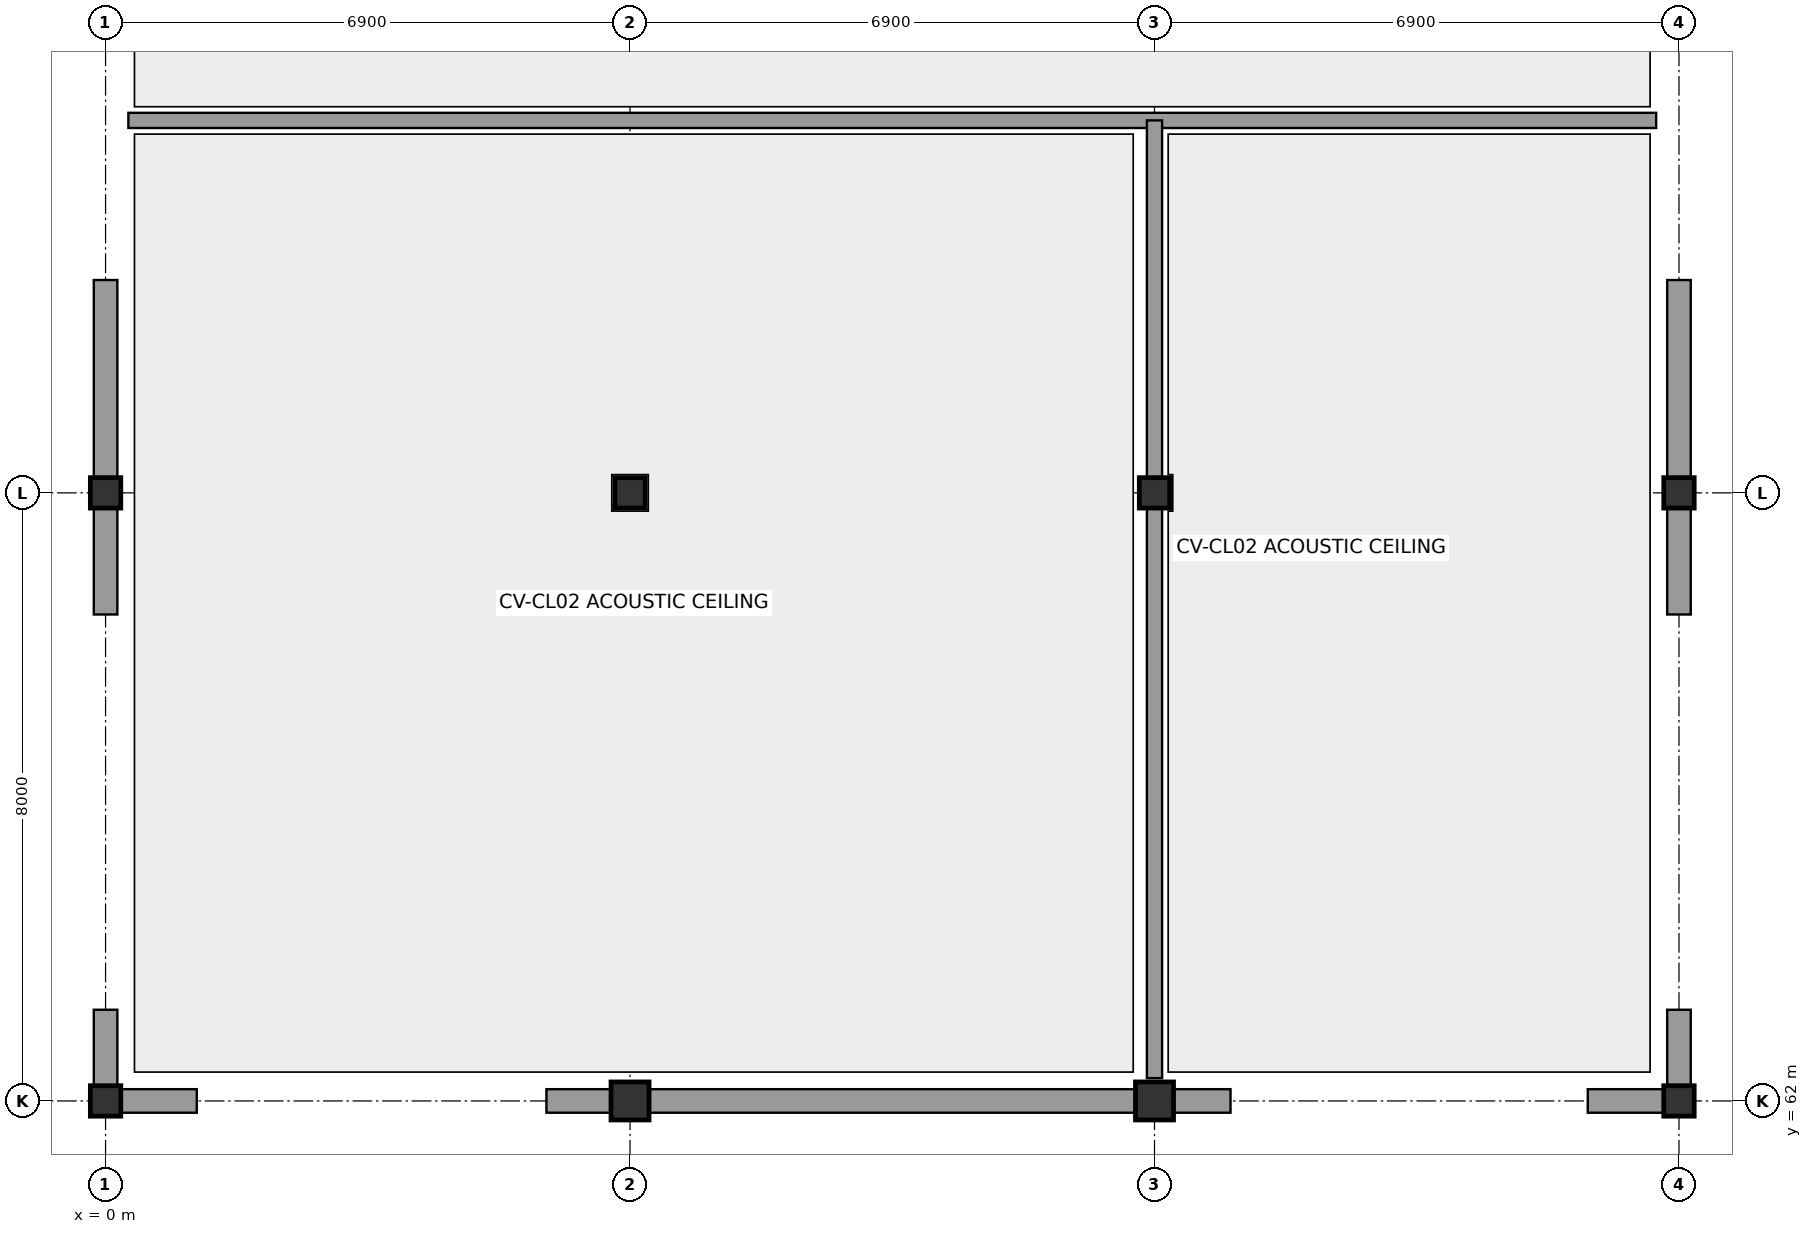
"""IFC4 building model, lengths in metres.
Left out: names, types, materials, properties, quantities, classifications, styles, units other than length and angle.
Written with IfcOpenShell. Run it as: python <this file> out.ifc"""

import sys

from ifc_helpers import new_model, si_unit, direction, frame, frame_2d, origin, origin_with_axes, origin_2d, place, context, subcontext, project, spatial, rectangle, circle, extrude, element, fill, save


model = new_model("IFC4")
c1 = context("Model", 3, precision=1e-05, world=origin(), true_north=direction((0.0, 1.0)))
c2 = subcontext(c1, "Body", "Model", "MODEL_VIEW")
j1 = project(units=[si_unit("LENGTHUNIT", "METRE"), si_unit("PLANEANGLEUNIT", "RADIAN")], contexts=[c1])
p1 = place(None, origin())
s1 = spatial("IfcSite", under=j1, at=p1, CompositionType="ELEMENT")
p2 = place(p1, origin())
s2 = spatial("IfcBuilding", under=s1, at=p2, CompositionType="ELEMENT")
p3 = place(p2, origin())
s3 = spatial("IfcBuildingStorey", under=s2, at=p3, CompositionType="ELEMENT", Elevation=0.0)
for number, where, z_axis, x_axis in (
    (1, (0.0, 62.0, 0.0), (0.0, 0.0, 1.0), (1.0, 0.0, 0.0)),
    (2, (0.0, 70.0, 0.0), (0.0, 0.0, 1.0), (1.0, 0.0, 0.0)),
):
    element("IfcColumn", number, at=place(p3, frame(where, z_axis=z_axis, x_axis=x_axis)), inside=s3, PredefinedType="COLUMN", context=c2, shape_type="SweptSolid", body=[
        extrude(rectangle(XDim=0.4, YDim=0.4, at=origin_2d()), origin(), (0.0, 0.0, 1.0), 4.4),
    ])
p4 = place(p3, frame((6.9, 62.0, 0.0), z_axis=(0.0, 0.0, 1.0), x_axis=(1.0, 0.0, 0.0)))
e3 = element("IfcColumn", 3, at=p4, inside=s3, PredefinedType="COLUMN", context=c2, shape_type="SweptSolid", body=[
    extrude(circle(Radius=0.25, at=origin_2d()), origin(), (0.0, 0.0, 1.0), 4.4),
])
p5 = place(p3, frame((6.9, 70.0, 0.0), z_axis=(0.0, 0.0, 1.0), x_axis=(1.0, 0.0, 0.0)))
e4 = element("IfcColumn", 4, at=p5, inside=s3, PredefinedType="COLUMN", context=c2, shape_type="SweptSolid", body=[
    extrude(rectangle(XDim=0.4, YDim=0.4, at=origin_2d()), origin(), (0.0, 0.0, 1.0), 4.4),
])
p6 = place(p3, frame((13.8, 62.0, 0.0), z_axis=(0.0, 0.0, 1.0), x_axis=(1.0, 0.0, 0.0)))
e5 = element("IfcColumn", 5, at=p6, inside=s3, PredefinedType="COLUMN", context=c2, shape_type="SweptSolid", body=[
    extrude(circle(Radius=0.25, at=origin_2d()), origin(), (0.0, 0.0, 1.0), 4.4),
])
for number, where, z_axis, x_axis in (
    (6, (13.8, 70.0, 0.0), (0.0, 0.0, 1.0), (1.0, 0.0, 0.0)),
    (7, (20.7, 62.0, 0.0), (0.0, 0.0, 1.0), (1.0, 0.0, 0.0)),
    (8, (20.7, 70.0, 0.0), (0.0, 0.0, 1.0), (1.0, 0.0, 0.0)),
):
    element("IfcColumn", number, at=place(p3, frame(where, z_axis=z_axis, x_axis=x_axis)), inside=s3, PredefinedType="COLUMN", context=c2, shape_type="SweptSolid", body=[
        extrude(rectangle(XDim=0.4, YDim=0.4, at=origin_2d()), origin(), (0.0, 0.0, 1.0), 4.4),
    ])
p7 = place(p3, frame((0.0, 62.0, 0.0), z_axis=(0.0, 0.0, 1.0), x_axis=(0.0, 1.0, 0.0)))
e9 = element("IfcWall", 9, at=p7, inside=s3, PredefinedType="STANDARD", context=c2, shape_type="SweptSolid", body=[
    extrude(rectangle(XDim=1.2, YDim=0.31, at=frame_2d((0.6, 0.0))), origin(), (0.0, 0.0, 1.0), 3.56),
])
p8 = place(p3, frame((0.0, 68.4, 0.0), z_axis=(0.0, 0.0, 1.0), x_axis=(0.0, 1.0, 0.0)))
e10 = element("IfcWall", 10, at=p8, inside=s3, PredefinedType="STANDARD", context=c2, shape_type="SweptSolid", body=[
    extrude(rectangle(XDim=4.4, YDim=0.31, at=frame_2d((2.2, 0.0))), origin(), (0.0, 0.0, 1.0), 3.56),
])
p9 = place(p8, frame((2.4, 0.0, 0.0)))
e11 = element("IfcOpeningElement", 11, at=p9, cuts=e10, PredefinedType="OPENING", context=c2, shape_type="SweptSolid", body=[
    extrude(rectangle(XDim=1.5, YDim=2.2, at=frame_2d((0.75, 1.1))), frame((0.0, 0.167, 0.0), z_axis=(0.0, -1.0, 0.0), x_axis=(1.0, 0.0, 0.0)), (0.0, 0.0, 1.0), 0.334),
])
p10 = place(p3, frame((20.7, 62.0, 0.0), z_axis=(0.0, 0.0, 1.0), x_axis=(0.0, 1.0, 0.0)))
e12 = element("IfcWall", 12, at=p10, inside=s3, PredefinedType="STANDARD", context=c2, shape_type="SweptSolid", body=[
    extrude(rectangle(XDim=1.2, YDim=0.31, at=frame_2d((0.6, 0.0))), origin(), (0.0, 0.0, 1.0), 3.56),
])
p11 = place(p3, frame((20.7, 68.4, 0.0), z_axis=(0.0, 0.0, 1.0), x_axis=(0.0, 1.0, 0.0)))
e13 = element("IfcWall", 13, at=p11, inside=s3, PredefinedType="STANDARD", context=c2, shape_type="SweptSolid", body=[
    extrude(rectangle(XDim=4.4, YDim=0.31, at=frame_2d((2.2, 0.0))), origin(), (0.0, 0.0, 1.0), 3.56),
])
p12 = place(p3, frame((0.0, 62.0, 0.0), z_axis=(0.0, 0.0, 1.0), x_axis=(1.0, 0.0, 0.0)))
e14 = element("IfcWall", 14, at=p12, inside=s3, PredefinedType="STANDARD", context=c2, shape_type="SweptSolid", body=[
    extrude(rectangle(XDim=1.2, YDim=0.31, at=frame_2d((0.6, 0.0))), origin(), (0.0, 0.0, 1.0), 3.36),
])
p13 = place(p3, frame((5.8, 62.0, 0.0), z_axis=(0.0, 0.0, 1.0), x_axis=(1.0, 0.0, 0.0)))
e15 = element("IfcWall", 15, at=p13, inside=s3, PredefinedType="STANDARD", context=c2, shape_type="SweptSolid", body=[
    extrude(rectangle(XDim=9.0, YDim=0.31, at=frame_2d((4.5, 0.0))), origin(), (0.0, 0.0, 1.0), 3.36),
])
p14 = place(p13, frame((3.8, 0.0, 0.0)))
e16 = element("IfcOpeningElement", 16, at=p14, cuts=e15, PredefinedType="OPENING", context=c2, shape_type="SweptSolid", body=[
    extrude(rectangle(XDim=1.5, YDim=2.2, at=frame_2d((0.75, 1.1))), frame((0.0, 0.167, 0.0), z_axis=(0.0, -1.0, 0.0), x_axis=(1.0, 0.0, 0.0)), (0.0, 0.0, 1.0), 0.334),
])
p15 = place(p3, frame((19.5, 62.0, 0.0), z_axis=(0.0, 0.0, 1.0), x_axis=(1.0, 0.0, 0.0)))
e17 = element("IfcWall", 17, at=p15, inside=s3, PredefinedType="STANDARD", context=c2, shape_type="SweptSolid", body=[
    extrude(rectangle(XDim=1.2, YDim=0.31, at=frame_2d((0.6, 0.0))), origin(), (0.0, 0.0, 1.0), 3.36),
])
p16 = place(p3, frame((0.3, 74.9, 0.0), z_axis=(0.0, 0.0, 1.0), x_axis=(1.0, 0.0, 0.0)))
e18 = element("IfcWall", 18, at=p16, inside=s3, PredefinedType="PARTITIONING", context=c2, shape_type="SweptSolid", body=[
    extrude(rectangle(XDim=20.1, YDim=0.2, at=frame_2d((10.05, 0.0))), origin(), (0.0, 0.0, 1.0), 4.12),
])
p17 = place(p16, frame((2.4, 0.0, 0.0)))
e19 = element("IfcOpeningElement", 19, at=p17, cuts=e18, PredefinedType="OPENING", context=c2, shape_type="SweptSolid", body=[
    extrude(rectangle(XDim=1.5, YDim=2.2, at=frame_2d((0.75, 1.1))), frame((0.0, 0.112, 0.0), z_axis=(0.0, -1.0, 0.0), x_axis=(1.0, 0.0, 0.0)), (0.0, 0.0, 1.0), 0.224),
])
p18 = place(p16, frame((15.6, 0.0, 0.0)))
e20 = element("IfcOpeningElement", 20, at=p18, cuts=e18, PredefinedType="OPENING", context=c2, shape_type="SweptSolid", body=[
    extrude(rectangle(XDim=1.0, YDim=2.15, at=frame_2d((0.5, 1.075))), frame((0.0, 0.112, 0.0), z_axis=(0.0, -1.0, 0.0), x_axis=(1.0, 0.0, 0.0)), (0.0, 0.0, 1.0), 0.224),
])
p19 = place(p3, frame((13.8, 62.3, 0.0), z_axis=(0.0, 0.0, 1.0), x_axis=(0.0, 1.0, 0.0)))
e21 = element("IfcWall", 21, at=p19, inside=s3, PredefinedType="PARTITIONING", context=c2, shape_type="SweptSolid", body=[
    extrude(rectangle(XDim=12.6, YDim=0.2, at=frame_2d((6.3, 0.0))), origin(), (0.0, 0.0, 1.0), 4.12),
])
p20 = place(p9, origin_with_axes())
e22 = element("IfcDoor", 22, at=p20, inside=s3, OperationType="DOUBLE_DOOR_SINGLE_SWING", PredefinedType="DOOR", context=c2, shape_type="SweptSolid", body=[
    extrude(rectangle(XDim=1.5, YDim=2.2, at=frame_2d((0.75, 1.1))), frame((0.0, 0.025, 0.0), z_axis=(0.0, -1.0, 0.0), x_axis=(1.0, 0.0, 0.0)), (0.0, 0.0, 1.0), 0.05),
])
fill(e11, e22)
p21 = place(p14, frame((1.5, 0.0, 0.0), z_axis=(0.0, 0.0, 1.0), x_axis=(-1.0, 0.0, 0.0)))
e23 = element("IfcDoor", 23, at=p21, inside=s3, OperationType="DOUBLE_DOOR_SINGLE_SWING", PredefinedType="DOOR", context=c2, shape_type="SweptSolid", body=[
    extrude(rectangle(XDim=1.5, YDim=2.2, at=frame_2d((0.75, 1.1))), frame((0.0, 0.025, 0.0), z_axis=(0.0, -1.0, 0.0), x_axis=(1.0, 0.0, 0.0)), (0.0, 0.0, 1.0), 0.05),
])
fill(e16, e23)
p22 = place(p17, origin_with_axes())
e24 = element("IfcDoor", 24, at=p22, inside=s3, OperationType="DOUBLE_DOOR_SINGLE_SWING", PredefinedType="DOOR", context=c2, shape_type="SweptSolid", body=[
    extrude(rectangle(XDim=1.5, YDim=2.2, at=frame_2d((0.75, 1.1))), frame((0.0, 0.025, 0.0), z_axis=(0.0, -1.0, 0.0), x_axis=(1.0, 0.0, 0.0)), (0.0, 0.0, 1.0), 0.05),
])
fill(e19, e24)
p23 = place(p18, frame((1.0, 0.0, 0.0), z_axis=(0.0, 0.0, 1.0), x_axis=(-1.0, 0.0, 0.0)))
e25 = element("IfcDoor", 25, at=p23, inside=s3, OperationType="SINGLE_SWING_LEFT", PredefinedType="DOOR", context=c2, shape_type="SweptSolid", body=[
    extrude(rectangle(XDim=1.0, YDim=2.15, at=frame_2d((0.5, 1.075))), frame((0.0, 0.025, 0.0), z_axis=(0.0, -1.0, 0.0), x_axis=(1.0, 0.0, 0.0)), (0.0, 0.0, 1.0), 0.05),
])
fill(e20, e25)
save(model, sys.argv[1])
